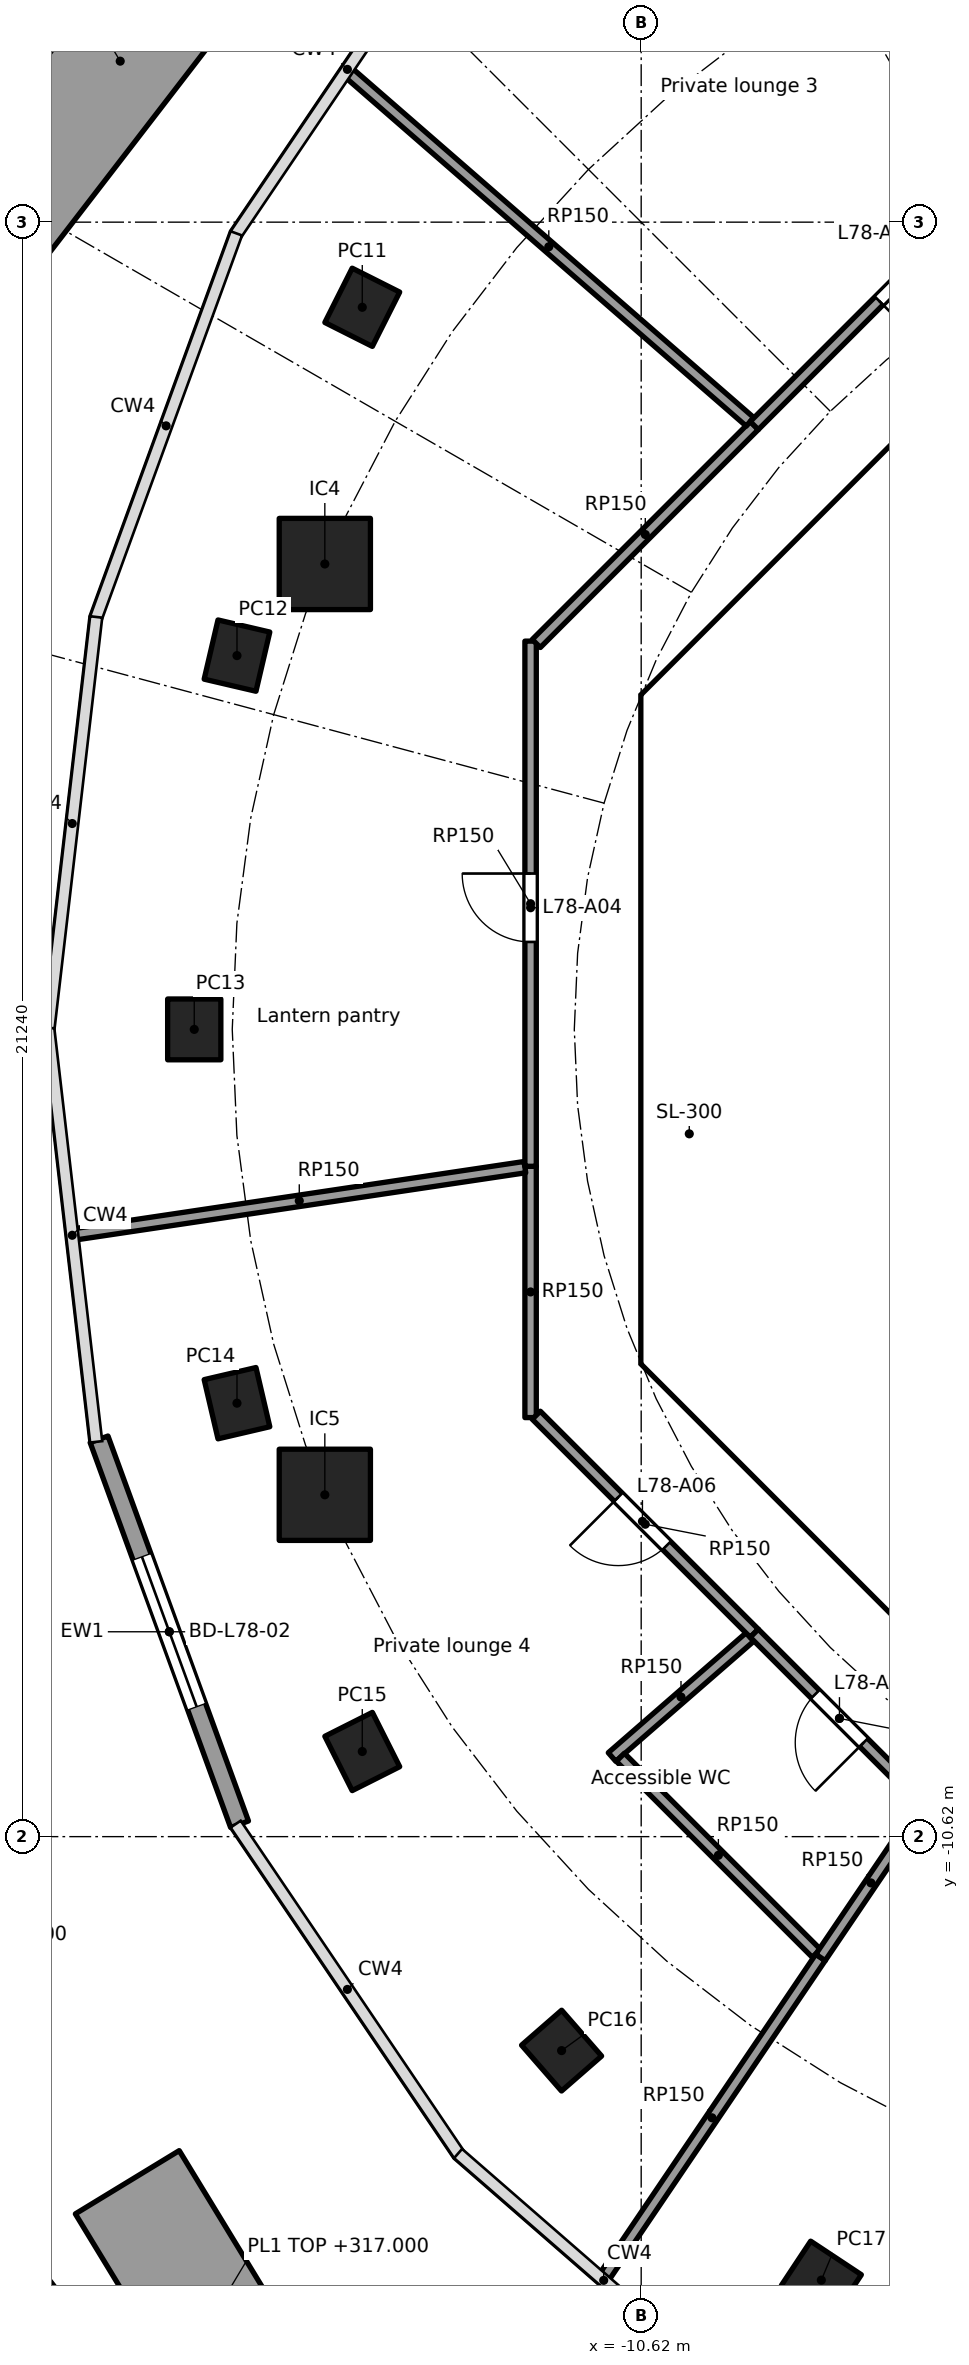
"""IFC4 building model, lengths in metres.
Left out: names, types, materials, properties, quantities, classifications, styles, units other than length and angle.
Written with IfcOpenShell. Run it as: python <this file> out.ifc"""

import sys

from ifc_helpers import new_model, si_unit, direction, frame, frame_2d, origin, origin_2d, place, context, subcontext, project, spatial, polyline, rectangle, hollow_rectangle, outline, extrude, element, fill, save


model = new_model("IFC4")
c1 = context("Model", 3, precision=1e-05, world=origin(), true_north=direction((0.0, 1.0)))
c2 = subcontext(c1, "Body", "Model", "MODEL_VIEW")
j1 = project(units=[si_unit("LENGTHUNIT", "METRE"), si_unit("PLANEANGLEUNIT", "RADIAN")], contexts=[c1])
p1 = place(None, origin())
s1 = spatial("IfcSite", under=j1, at=p1, CompositionType="ELEMENT")
p2 = place(p1, origin())
s2 = spatial("IfcBuilding", under=s1, at=p2, CompositionType="ELEMENT")
p3 = place(p2, frame((0.0, 0.0, 315.9)))
s3 = spatial("IfcBuildingStorey", under=s2, at=p3, CompositionType="ELEMENT", Elevation=315.9)
for number, where, z_axis, x_axis in (
    (1, (-14.289, 9.5, -0.3), (0.0, 0.0, 1.0), (-0.45, -0.893, 0.0)),
    (2, (-15.938, 4.917, -0.3), (0.0, 0.0, 1.0), (-0.227, -0.974, 0.0)),
    (3, (-16.5, 0.0, -0.3), (0.0, 0.0, 1.0), (0.0, -1.0, 0.0)),
    (4, (-15.938, -4.917, -0.3), (0.0, 0.0, 1.0), (0.227, -0.974, 0.0)),
    (5, (-14.289, -9.5, -0.3), (0.0, 0.0, 1.0), (0.45, -0.893, 0.0)),
    (6, (-11.667, -13.435, -0.3), (0.0, 0.0, 1.0), (0.657, -0.754, 0.0)),
    (7, (-8.25, -16.455, -0.3), (0.0, 0.0, 1.0), (0.834, -0.552, 0.0)),
):
    element("IfcColumn", number, at=place(p3, frame(where, z_axis=z_axis, x_axis=x_axis)), inside=s3, PredefinedType="COLUMN", context=c2, shape_type="SweptSolid", body=[
        extrude(hollow_rectangle(XDim=0.8, YDim=0.7, WallThickness=0.025, at=origin_2d()), origin(), (0.0, 0.0, 1.0), 4.8),
    ])
for number, where, z_axis, x_axis in (
    (8, (-14.782, 6.123, 0.0), (0.0, 0.0, 1.0), (1.0, 0.0, 0.0)),
    (9, (-14.782, -6.123, 0.0), (0.0, 0.0, 1.0), (1.0, 0.0, 0.0)),
):
    element("IfcColumn", number, at=place(p3, frame(where, z_axis=z_axis, x_axis=x_axis)), inside=s3, PredefinedType="COLUMN", context=c2, shape_type="SweptSolid", body=[
        extrude(rectangle(XDim=1.2, YDim=1.2, at=origin_2d()), origin(), (0.0, 0.0, 1.0), 4.5),
    ])
p4 = place(p3, frame((-15.904, -10.457, 0.0), z_axis=(0.0, 0.0, 1.0), x_axis=(-0.342797263009, 0.939409408338, 0.0)))
e10 = element("IfcWall", 10, at=p4, inside=s3, PredefinedType="SOLIDWALL", context=c2, shape_type="SweptSolid", body=[
    extrude(rectangle(XDim=5.391, YDim=0.25, at=frame_2d((2.696, 0.0))), origin(), (0.0, 0.0, 1.0), 4.2),
])
p5 = place(p4, frame((1.646, 0.0, 0.0)))
e11 = element("IfcOpeningElement", 11, at=p5, cuts=e10, PredefinedType="OPENING", context=c2, shape_type="SweptSolid", body=[
    extrude(rectangle(XDim=2.1, YDim=2.4, at=frame_2d((1.05, 1.2))), frame((0.0, 0.135, 0.0), z_axis=(0.0, -1.0, 0.0), x_axis=(1.0, 0.0, 0.0)), (0.0, 0.0, 1.0), 0.27),
])
p6 = place(p3, frame((-20.125, 9.296, 0.0), z_axis=(0.0, 0.0, 1.0), x_axis=(0.61024421244, 0.792213355848, 0.0)))
e12 = element("IfcWall", 12, at=p6, inside=s3, PredefinedType="SOLIDWALL", context=c2, shape_type="SweptSolid", body=[
    extrude(rectangle(XDim=8.69, YDim=1.6, at=frame_2d((4.345, 0.0))), origin(), (0.0, 0.0, 1.0), 1.1),
])
p7 = place(p3, frame((-14.826, -22.411, 0.0), z_axis=(0.0, 0.0, 1.0), x_axis=(-0.610248456387, 0.792210086705, 0.0)))
e13 = element("IfcWall", 13, at=p7, inside=s3, PredefinedType="SOLIDWALL", context=c2, shape_type="SweptSolid", body=[
    extrude(rectangle(XDim=8.709, YDim=1.6, at=frame_2d((4.354, 0.0))), origin(), (0.0, 0.0, 1.0), 1.1),
])
p8 = place(p3, frame((-15.175, -18.79, 0.0), z_axis=(0.0, 0.0, 1.0), x_axis=(-0.520029112325, 0.854148536459, 0.0)))
e14 = element("IfcWall", 14, at=p8, inside=s3, PredefinedType="SOLIDWALL", context=c2, shape_type="SweptSolid", body=[
    extrude(rectangle(XDim=4.242, YDim=1.6, at=frame_2d((2.121, 0.0))), origin(), (0.0, 0.0, 1.0), 1.1),
])
p9 = place(p3, frame((-4.613, 9.988, 0.0), z_axis=(0.0, 0.0, 1.0), x_axis=(-0.707106781187, -0.707106781187, 0.0)))
e15 = element("IfcWall", 15, at=p9, inside=s3, PredefinedType="SHEAR", context=c2, shape_type="SweptSolid", body=[
    extrude(rectangle(XDim=7.602, YDim=0.6, at=frame_2d((3.801, 0.0))), origin(), (0.0, 0.0, 1.0), 4.2),
])
p10 = place(p9, frame((0.351, 0.0, 0.0)))
e16 = element("IfcOpeningElement", 16, at=p10, cuts=e15, PredefinedType="OPENING", context=c2, shape_type="SweptSolid", body=[
    extrude(rectangle(XDim=1.1, YDim=2.1, at=frame_2d((0.55, 1.05))), frame((0.0, 0.31, 0.0), z_axis=(0.0, -1.0, 0.0), x_axis=(1.0, 0.0, 0.0)), (0.0, 0.0, 1.0), 0.62),
])
p11 = place(p3, frame((-10.325, 3.801, 0.0), z_axis=(0.0, 0.0, 1.0), x_axis=(0.0, -1.0, 0.0)))
e17 = element("IfcWall", 17, at=p11, inside=s3, PredefinedType="SHEAR", context=c2, shape_type="SweptSolid", body=[
    extrude(rectangle(XDim=7.602, YDim=0.6, at=frame_2d((3.801, 0.0))), origin(), (0.0, 0.0, 1.0), 4.2),
])
p12 = place(p11, frame((0.651, 0.0, 0.0)))
e18 = element("IfcOpeningElement", 18, at=p12, cuts=e17, PredefinedType="OPENING", context=c2, shape_type="SweptSolid", body=[
    extrude(rectangle(XDim=1.5, YDim=2.1, at=frame_2d((0.75, 1.05))), frame((0.0, 0.31, 0.0), z_axis=(0.0, -1.0, 0.0), x_axis=(1.0, 0.0, 0.0)), (0.0, 0.0, 1.0), 0.62),
])
p13 = place(p11, frame((5.451, 0.0, 0.0)))
e19 = element("IfcOpeningElement", 19, at=p13, cuts=e17, PredefinedType="OPENING", context=c2, shape_type="SweptSolid", body=[
    extrude(rectangle(XDim=1.5, YDim=2.1, at=frame_2d((0.75, 1.05))), frame((0.0, 0.31, 0.0), z_axis=(0.0, -1.0, 0.0), x_axis=(1.0, 0.0, 0.0)), (0.0, 0.0, 1.0), 0.62),
])
p14 = place(p3, frame((-9.988, -4.613, 0.0), z_axis=(0.0, 0.0, 1.0), x_axis=(0.707106781187, -0.707106781187, 0.0)))
e20 = element("IfcWall", 20, at=p14, inside=s3, PredefinedType="SHEAR", context=c2, shape_type="SweptSolid", body=[
    extrude(rectangle(XDim=7.602, YDim=0.6, at=frame_2d((3.801, 0.0))), origin(), (0.0, 0.0, 1.0), 4.2),
])
p15 = place(p14, frame((6.151, 0.0, 0.0)))
e21 = element("IfcOpeningElement", 21, at=p15, cuts=e20, PredefinedType="OPENING", context=c2, shape_type="SweptSolid", body=[
    extrude(rectangle(XDim=1.1, YDim=2.1, at=frame_2d((0.55, 1.05))), frame((0.0, 0.31, 0.0), z_axis=(0.0, -1.0, 0.0), x_axis=(1.0, 0.0, 0.0)), (0.0, 0.0, 1.0), 0.62),
])
p16 = place(p3, origin())
e22 = element("IfcWall", 22, at=p16, inside=s3, PredefinedType="SHEAR", context=c2, shape_type="SweptSolid", body=[
    extrude(outline(polyline([(-10.625, -3.801), (-10.025, -3.801), (-10.025, -4.152), (-9.776, -4.401), (-10.2, -4.825), (-10.625, -4.401), (-10.625, -3.801)])), origin(), (0.0, 0.0, 1.0), 4.2),
])
p17 = place(p3, origin())
e23 = element("IfcWall", 23, at=p17, inside=s3, PredefinedType="SHEAR", context=c2, shape_type="SweptSolid", body=[
    extrude(outline(polyline([(-10.2, 4.825), (-9.776, 4.401), (-10.025, 4.152), (-10.025, 3.801), (-10.625, 3.801), (-10.625, 4.401), (-10.2, 4.825)])), origin(), (0.0, 0.0, 1.0), 4.2),
])
for number, where, z_axis, x_axis in (
    (24, (-10.025, -4.0, 0.0), (0.0, 0.0, 1.0), (1.0, 0.0, 0.0)),
    (25, (-10.025, 4.0, 0.0), (0.0, 0.0, 1.0), (1.0, 0.0, 0.0)),
):
    element("IfcWall", number, at=place(p3, frame(where, z_axis=z_axis, x_axis=x_axis)), inside=s3, PredefinedType="PARTITIONING", context=c2, shape_type="SweptSolid", body=[
        extrude(rectangle(XDim=3.325, YDim=0.2, at=frame_2d((1.662, 0.0))), origin(), (0.0, 0.0, 1.0), 4.2),
    ])
p18 = place(p3, frame((-12.075, -5.107, 0.0), z_axis=(0.0, 0.0, 1.0), x_axis=(0.0, 1.0, 0.0)))
e26 = element("IfcWall", 26, at=p18, inside=s3, PredefinedType="PARTITIONING", context=c2, shape_type="SweptSolid", body=[
    extrude(rectangle(XDim=3.306, YDim=0.15, at=frame_2d((1.653, 0.0))), origin(), (0.0, 0.0, 1.0), 4.2),
])
p19 = place(p3, frame((-12.15, -1.812, 0.0), z_axis=(0.0, 0.0, 1.0), x_axis=(-0.989039934914, -0.147648254801, 0.0)))
e27 = element("IfcWall", 27, at=p19, inside=s3, PredefinedType="PARTITIONING", context=c2, shape_type="SweptSolid", body=[
    extrude(rectangle(XDim=6.002, YDim=0.15, at=frame_2d((3.001, 0.0))), origin(), (0.0, 0.0, 1.0), 4.2),
])
p20 = place(p3, frame((-12.075, -1.801, 0.0), z_axis=(0.0, 0.0, 1.0), x_axis=(0.0, 1.0, 0.0)))
e28 = element("IfcWall", 28, at=p20, inside=s3, PredefinedType="PARTITIONING", context=c2, shape_type="SweptSolid", body=[
    extrude(rectangle(XDim=6.909, YDim=0.15, at=frame_2d((3.455, 0.0))), origin(), (0.0, 0.0, 1.0), 4.2),
])
p21 = place(p20, frame((2.951, 0.0, 0.0)))
e29 = element("IfcOpeningElement", 29, at=p21, cuts=e28, PredefinedType="OPENING", context=c2, shape_type="SweptSolid", body=[
    extrude(rectangle(XDim=0.9, YDim=2.1, at=frame_2d((0.45, 1.05))), frame((0.0, 0.085, 0.0), z_axis=(0.0, -1.0, 0.0), x_axis=(1.0, 0.0, 0.0)), (0.0, 0.0, 1.0), 0.17),
])
p22 = place(p3, frame((-12.0, 5.077, 0.0), z_axis=(0.0, 0.0, 1.0), x_axis=(0.707197078955, 0.707016471886, 0.0)))
e30 = element("IfcWall", 30, at=p22, inside=s3, PredefinedType="PARTITIONING", context=c2, shape_type="SweptSolid", body=[
    extrude(rectangle(XDim=4.055, YDim=0.15, at=frame_2d((2.028, 0.0))), origin(), (0.0, 0.0, 1.0), 4.2),
])
p23 = place(p3, frame((-11.004, -9.572, 0.0), z_axis=(0.0, 0.0, 1.0), x_axis=(0.754472226649, 0.65633197333, 0.0)))
e31 = element("IfcWall", 31, at=p23, inside=s3, PredefinedType="PARTITIONING", context=c2, shape_type="SweptSolid", body=[
    extrude(rectangle(XDim=2.406, YDim=0.15, at=frame_2d((1.203, 0.0))), origin(), (0.0, 0.0, 1.0), 4.2),
])
p24 = place(p3, frame((-9.132, -7.944, 0.0), z_axis=(0.0, 0.0, 1.0), x_axis=(-0.707076684492, 0.7071368766, 0.0)))
e32 = element("IfcWall", 32, at=p24, inside=s3, PredefinedType="PARTITIONING", context=c2, shape_type="SweptSolid", body=[
    extrude(rectangle(XDim=4.056, YDim=0.15, at=frame_2d((2.028, 0.0))), origin(), (0.0, 0.0, 1.0), 4.2),
])
p25 = place(p24, frame((1.631, 0.0, 0.0)))
e33 = element("IfcOpeningElement", 33, at=p25, cuts=e32, PredefinedType="OPENING", context=c2, shape_type="SweptSolid", body=[
    extrude(rectangle(XDim=0.9, YDim=2.1, at=frame_2d((0.45, 1.05))), frame((0.0, 0.085, 0.0), z_axis=(0.0, -1.0, 0.0), x_axis=(1.0, 0.0, 0.0)), (0.0, 0.0, 1.0), 0.17),
])
p26 = place(p3, frame((-9.189, 7.993, 0.0), z_axis=(0.0, 0.0, 1.0), x_axis=(-0.754481157007, 0.656321707489, 0.0)))
e34 = element("IfcWall", 34, at=p26, inside=s3, PredefinedType="PARTITIONING", context=c2, shape_type="SweptSolid", body=[
    extrude(rectangle(XDim=7.016, YDim=0.15, at=frame_2d((3.508, 0.0))), origin(), (0.0, 0.0, 1.0), 4.2),
])
p27 = place(p3, frame((-9.132, 7.944, 0.0), z_axis=(0.0, 0.0, 1.0), x_axis=(0.707127303506, 0.707086258271, 0.0)))
e35 = element("IfcWall", 35, at=p27, inside=s3, PredefinedType="PARTITIONING", context=c2, shape_type="SweptSolid", body=[
    extrude(rectangle(XDim=5.948, YDim=0.15, at=frame_2d((2.974, 0.0))), origin(), (0.0, 0.0, 1.0), 4.2),
])
p28 = place(p27, frame((2.321, 0.0, 0.0)))
e36 = element("IfcOpeningElement", 36, at=p28, cuts=e35, PredefinedType="OPENING", context=c2, shape_type="SweptSolid", body=[
    extrude(rectangle(XDim=1.2, YDim=2.1, at=frame_2d((0.6, 1.05))), frame((0.0, 0.085, 0.0), z_axis=(0.0, -1.0, 0.0), x_axis=(1.0, 0.0, 0.0)), (0.0, 0.0, 1.0), 0.17),
])
p29 = place(p3, frame((-8.315, -12.155, 0.0), z_axis=(0.0, 0.0, 1.0), x_axis=(-0.707106781187, 0.707106781187, 0.0)))
e37 = element("IfcWall", 37, at=p29, inside=s3, PredefinedType="PARTITIONING", context=c2, shape_type="SweptSolid", body=[
    extrude(rectangle(XDim=3.647, YDim=0.15, at=frame_2d((1.823, 0.0))), origin(), (0.0, 0.0, 1.0), 4.2),
])
p30 = place(p3, frame((-8.261, -12.209, 0.0), z_axis=(0.0, 0.0, 1.0), x_axis=(-0.560426361266, -0.82820425838, 0.0)))
e38 = element("IfcWall", 38, at=p30, inside=s3, PredefinedType="PARTITIONING", context=c2, shape_type="SweptSolid", body=[
    extrude(rectangle(XDim=5.095, YDim=0.15, at=frame_2d((2.547, 0.0))), origin(), (0.0, 0.0, 1.0), 4.2),
])
p31 = place(p3, frame((-6.891, -10.185, 0.0), z_axis=(0.0, 0.0, 1.0), x_axis=(-0.707106781187, 0.707106781187, 0.0)))
e39 = element("IfcWall", 39, at=p31, inside=s3, PredefinedType="PARTITIONING", context=c2, shape_type="SweptSolid", body=[
    extrude(rectangle(XDim=3.169, YDim=0.15, at=frame_2d((1.584, 0.0))), origin(), (0.0, 0.0, 1.0), 4.2),
])
p32 = place(p31, frame((1.135, 0.0, 0.0)))
e40 = element("IfcOpeningElement", 40, at=p32, cuts=e39, PredefinedType="OPENING", context=c2, shape_type="SweptSolid", body=[
    extrude(rectangle(XDim=0.9, YDim=2.1, at=frame_2d((0.45, 1.05))), frame((0.0, 0.085, 0.0), z_axis=(0.0, -1.0, 0.0), x_axis=(1.0, 0.0, 0.0)), (0.0, 0.0, 1.0), 0.17),
])
p33 = place(p3, frame((-6.934, -10.248, 0.0), z_axis=(0.0, 0.0, 1.0), x_axis=(-0.560540301995, -0.828127145938, 0.0)))
e41 = element("IfcWall", 41, at=p33, inside=s3, PredefinedType="PARTITIONING", context=c2, shape_type="SweptSolid", body=[
    extrude(rectangle(XDim=2.368, YDim=0.15, at=frame_2d((1.184, 0.0))), origin(), (0.0, 0.0, 1.0), 4.2),
])
p34 = place(p5, origin())
e42 = element("IfcDoor", 42, at=p34, inside=s3, OperationType="SLIDING_TO_LEFT", PredefinedType="DOOR", context=c2, shape_type="SweptSolid", body=[
    extrude(rectangle(XDim=2.1, YDim=2.4, at=frame_2d((1.05, 1.2))), frame((0.0, 0.025, 0.0), z_axis=(0.0, -1.0, 0.0), x_axis=(1.0, 0.0, 0.0)), (0.0, 0.0, 1.0), 0.05),
])
fill(e11, e42)
p35 = place(p12, origin())
e43 = element("IfcDoor", 43, at=p35, inside=s3, OperationType="DOUBLE_DOOR_SINGLE_SWING", PredefinedType="DOOR", context=c2, shape_type="SweptSolid", body=[
    extrude(rectangle(XDim=1.5, YDim=2.1, at=frame_2d((0.75, 1.05))), frame((0.0, 0.025, 0.0), z_axis=(0.0, -1.0, 0.0), x_axis=(1.0, 0.0, 0.0)), (0.0, 0.0, 1.0), 0.05),
])
fill(e18, e43)
p36 = place(p13, origin())
e44 = element("IfcDoor", 44, at=p36, inside=s3, OperationType="DOUBLE_DOOR_SINGLE_SWING", PredefinedType="DOOR", context=c2, shape_type="SweptSolid", body=[
    extrude(rectangle(XDim=1.5, YDim=2.1, at=frame_2d((0.75, 1.05))), frame((0.0, 0.025, 0.0), z_axis=(0.0, -1.0, 0.0), x_axis=(1.0, 0.0, 0.0)), (0.0, 0.0, 1.0), 0.05),
])
fill(e19, e44)
p37 = place(p28, frame((1.2, 0.0, 0.0), x_axis=(-1.0, 0.0, 0.0)))
e45 = element("IfcDoor", 45, at=p37, inside=s3, OperationType="SINGLE_SWING_RIGHT", PredefinedType="DOOR", context=c2, shape_type="SweptSolid", body=[
    extrude(rectangle(XDim=1.2, YDim=2.1, at=frame_2d((0.6, 1.05))), frame((0.0, 0.025, 0.0), z_axis=(0.0, -1.0, 0.0), x_axis=(1.0, 0.0, 0.0)), (0.0, 0.0, 1.0), 0.05),
])
fill(e36, e45)
p38 = place(p21, origin())
e46 = element("IfcDoor", 46, at=p38, inside=s3, OperationType="SINGLE_SWING_RIGHT", PredefinedType="DOOR", context=c2, shape_type="SweptSolid", body=[
    extrude(rectangle(XDim=0.9, YDim=2.1, at=frame_2d((0.45, 1.05))), frame((0.0, 0.025, 0.0), z_axis=(0.0, -1.0, 0.0), x_axis=(1.0, 0.0, 0.0)), (0.0, 0.0, 1.0), 0.05),
])
fill(e29, e46)
p39 = place(p32, origin())
e47 = element("IfcDoor", 47, at=p39, inside=s3, OperationType="SINGLE_SWING_LEFT", PredefinedType="DOOR", context=c2, shape_type="SweptSolid", body=[
    extrude(rectangle(XDim=0.9, YDim=2.1, at=frame_2d((0.45, 1.05))), frame((0.0, 0.025, 0.0), z_axis=(0.0, -1.0, 0.0), x_axis=(1.0, 0.0, 0.0)), (0.0, 0.0, 1.0), 0.05),
])
fill(e40, e47)
p40 = place(p25, origin())
e48 = element("IfcDoor", 48, at=p40, inside=s3, OperationType="SINGLE_SWING_RIGHT", PredefinedType="DOOR", context=c2, shape_type="SweptSolid", body=[
    extrude(rectangle(XDim=0.9, YDim=2.1, at=frame_2d((0.45, 1.05))), frame((0.0, 0.025, 0.0), z_axis=(0.0, -1.0, 0.0), x_axis=(1.0, 0.0, 0.0)), (0.0, 0.0, 1.0), 0.05),
])
fill(e33, e48)
save(model, sys.argv[1])
